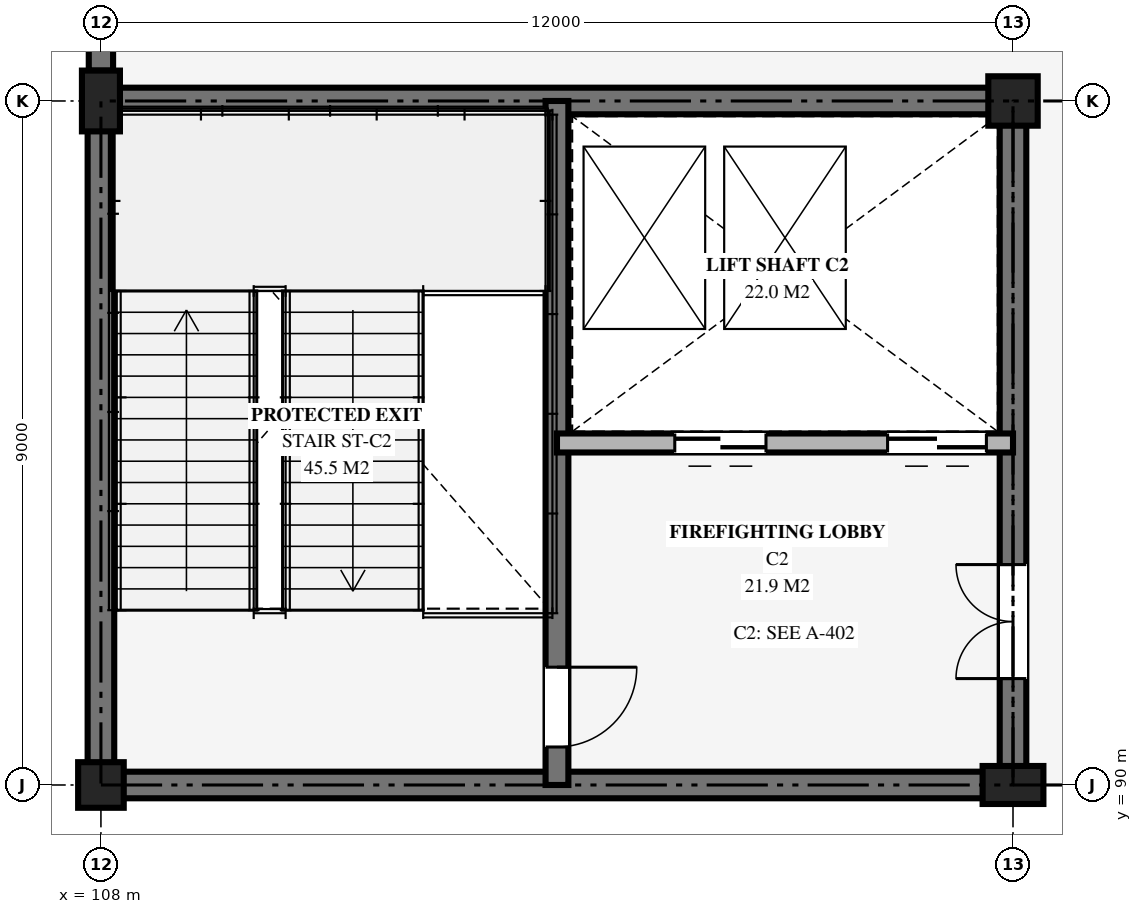
"""IFC4 building model, lengths in metres.
Left out: names, types, materials, properties, quantities, classifications, styles, units other than length and angle.
Written with IfcOpenShell. Run it as: python <this file> out.ifc"""

import sys

from ifc_helpers import new_model, si_unit, direction, frame, frame_2d, origin, origin_2d, place, context, subcontext, project, spatial, rectangle, circle, extrude, element, fill, save


model = new_model("IFC4")
c1 = context("Model", 3, precision=1e-05, world=origin(), true_north=direction((0.0, 1.0)))
c2 = subcontext(c1, "Body", "Model", "MODEL_VIEW")
j1 = project(units=[si_unit("LENGTHUNIT", "METRE"), si_unit("PLANEANGLEUNIT", "RADIAN")], contexts=[c1])
p1 = place(None, origin())
s1 = spatial("IfcSite", under=j1, at=p1, CompositionType="ELEMENT")
p2 = place(p1, origin())
s2 = spatial("IfcBuilding", under=s1, at=p2, CompositionType="ELEMENT")
p3 = place(p2, frame((0.0, 0.0, 15.0)))
s3 = spatial("IfcBuildingStorey", under=s2, at=p3, CompositionType="ELEMENT", Elevation=15.0)
p4 = place(p3, frame((108.0, 90.0, 0.0), z_axis=(0.0, 0.0, 1.0), x_axis=(1.0, 0.0, 0.0)))
e1 = element("IfcColumn", 1, at=p4, inside=s3, PredefinedType="COLUMN", context=c2, shape_type="SweptSolid", body=[
    extrude(circle(Radius=0.3, at=origin_2d()), origin(), (0.0, 0.0, 1.0), 4.34),
])
for number, where, z_axis, x_axis in (
    (2, (108.0, 99.0, 0.0), (0.0, 0.0, 1.0), (1.0, 0.0, 0.0)),
    (3, (120.0, 90.0, 0.0), (0.0, 0.0, 1.0), (0.0, 1.0, 0.0)),
):
    element("IfcColumn", number, at=place(p3, frame(where, z_axis=z_axis, x_axis=x_axis)), inside=s3, PredefinedType="PILASTER", context=c2, shape_type="SweptSolid", body=[
        extrude(rectangle(XDim=0.5, YDim=0.8, at=origin_2d()), origin(), (0.0, 0.0, 1.0), 4.34),
    ])
p5 = place(p3, frame((120.0, 99.0, 0.0), z_axis=(0.0, 0.0, 1.0), x_axis=(1.0, 0.0, 0.0)))
e4 = element("IfcColumn", 4, at=p5, inside=s3, PredefinedType="COLUMN", context=c2, shape_type="SweptSolid", body=[
    extrude(rectangle(XDim=0.65, YDim=0.65, at=origin_2d()), origin(), (0.0, 0.0, 1.0), 4.34),
])
p6 = place(p3, frame((108.0, 107.6, 0.0), z_axis=(0.0, 0.0, 1.0), x_axis=(0.0, -1.0, 0.0)))
e5 = element("IfcWall", 5, at=p6, inside=s3, PredefinedType="SOLIDWALL", context=c2, shape_type="SweptSolid", body=[
    extrude(rectangle(XDim=8.2, YDim=0.32, at=frame_2d((4.1, 0.0))), origin(), (0.0, 0.0, 1.0), 4.24),
])
p7 = place(p6, frame((3.2, 0.0, 1.0)))
e6 = element("IfcOpeningElement", 6, at=p7, cuts=e5, PredefinedType="OPENING", context=c2, shape_type="SweptSolid", body=[
    extrude(rectangle(XDim=1.8, YDim=1.5, at=frame_2d((0.9, 0.75))), frame((0.0, 0.17, 0.0), z_axis=(0.0, -1.0, 0.0), x_axis=(1.0, 0.0, 0.0)), (0.0, 0.0, 1.0), 0.34),
])
for number, where, z_axis, x_axis in (
    (7, (108.0, 90.0, 0.0), (0.0, 0.0, 1.0), (1.0, 0.0, 0.0)),
    (8, (108.0, 99.0, 0.0), (0.0, 0.0, 1.0), (1.0, 0.0, 0.0)),
):
    element("IfcWall", number, at=place(p3, frame(where, z_axis=z_axis, x_axis=x_axis)), inside=s3, PredefinedType="SHEAR", context=c2, shape_type="SweptSolid", body=[
        extrude(rectangle(XDim=12.0, YDim=0.35, at=frame_2d((6.0, 0.0))), origin(), (0.0, 0.0, 1.0), 4.48),
    ])
p8 = place(p3, frame((108.0, 90.0, 0.0), z_axis=(0.0, 0.0, 1.0), x_axis=(0.0, 1.0, 0.0)))
e9 = element("IfcWall", 9, at=p8, inside=s3, PredefinedType="SHEAR", context=c2, shape_type="SweptSolid", body=[
    extrude(rectangle(XDim=9.0, YDim=0.35, at=frame_2d((4.5, 0.0))), origin(), (0.0, 0.0, 1.0), 4.48),
])
p9 = place(p3, frame((120.0, 90.0, 0.0), z_axis=(0.0, 0.0, 1.0), x_axis=(0.0, 1.0, 0.0)))
e10 = element("IfcWall", 10, at=p9, inside=s3, PredefinedType="SHEAR", context=c2, shape_type="SweptSolid", body=[
    extrude(rectangle(XDim=9.0, YDim=0.35, at=frame_2d((4.5, 0.0))), origin(), (0.0, 0.0, 1.0), 4.48),
])
p10 = place(p9, frame((1.4, 0.0, 0.0)))
e11 = element("IfcOpeningElement", 11, at=p10, cuts=e10, PredefinedType="OPENING", context=c2, shape_type="SweptSolid", body=[
    extrude(rectangle(XDim=1.5, YDim=2.2, at=frame_2d((0.75, 1.1))), frame((0.0, 0.185, 0.0), z_axis=(0.0, -1.0, 0.0), x_axis=(1.0, 0.0, 0.0)), (0.0, 0.0, 1.0), 0.37),
])
p11 = place(p3, frame((114.0, 99.0, 0.0), z_axis=(0.0, 0.0, 1.0), x_axis=(0.0, -1.0, 0.0)))
e12 = element("IfcWall", 12, at=p11, inside=s3, PredefinedType="SHEAR", context=c2, shape_type="SweptSolid", body=[
    extrude(rectangle(XDim=9.0, YDim=0.3, at=frame_2d((4.5, 0.0))), origin(), (0.0, 0.0, 1.0), 4.48),
])
p12 = place(p11, frame((7.45, 0.0, 0.0)))
e13 = element("IfcOpeningElement", 13, at=p12, cuts=e12, PredefinedType="OPENING", context=c2, shape_type="SweptSolid", body=[
    extrude(rectangle(XDim=1.05, YDim=2.15, at=frame_2d((0.525, 1.075))), frame((0.0, 0.16, 0.0), z_axis=(0.0, -1.0, 0.0), x_axis=(1.0, 0.0, 0.0)), (0.0, 0.0, 1.0), 0.32),
])
p13 = place(p3, frame((120.0, 94.5, 0.0), z_axis=(0.0, 0.0, 1.0), x_axis=(-1.0, 0.0, 0.0)))
e14 = element("IfcWall", 14, at=p13, inside=s3, PredefinedType="SOLIDWALL", context=c2, shape_type="SweptSolid", body=[
    extrude(rectangle(XDim=6.0, YDim=0.25, at=frame_2d((3.0, 0.0))), origin(), (0.0, 0.0, 1.0), 3.45),
])
p14 = place(p13, frame((0.35, 0.0, 0.0)))
e15 = element("IfcOpeningElement", 15, at=p14, cuts=e14, PredefinedType="OPENING", context=c2, shape_type="SweptSolid", body=[
    extrude(rectangle(XDim=1.3, YDim=2.25, at=frame_2d((0.65, 1.125))), frame((0.0, 0.135, 0.0), z_axis=(0.0, -1.0, 0.0), x_axis=(1.0, 0.0, 0.0)), (0.0, 0.0, 1.0), 0.27),
])
p15 = place(p13, frame((3.25, 0.0, 0.0)))
e16 = element("IfcOpeningElement", 16, at=p15, cuts=e14, PredefinedType="OPENING", context=c2, shape_type="SweptSolid", body=[
    extrude(rectangle(XDim=1.2, YDim=2.2, at=frame_2d((0.6, 1.1))), frame((0.0, 0.135, 0.0), z_axis=(0.0, -1.0, 0.0), x_axis=(1.0, 0.0, 0.0)), (0.0, 0.0, 1.0), 0.27),
])
p16 = place(p14, origin())
e17 = element("IfcDoor", 17, at=p16, inside=s3, OperationType="DOUBLE_DOOR_SLIDING", PredefinedType="USERDEFINED", context=c2, shape_type="SweptSolid", body=[
    extrude(rectangle(XDim=1.3, YDim=2.25, at=frame_2d((0.65, 1.125))), frame((0.0, 0.025, 0.0), z_axis=(0.0, -1.0, 0.0), x_axis=(1.0, 0.0, 0.0)), (0.0, 0.0, 1.0), 0.05),
])
fill(e15, e17)
p17 = place(p15, origin())
e18 = element("IfcDoor", 18, at=p17, inside=s3, OperationType="DOUBLE_DOOR_SLIDING", PredefinedType="USERDEFINED", context=c2, shape_type="SweptSolid", body=[
    extrude(rectangle(XDim=1.2, YDim=2.2, at=frame_2d((0.6, 1.1))), frame((0.0, 0.025, 0.0), z_axis=(0.0, -1.0, 0.0), x_axis=(1.0, 0.0, 0.0)), (0.0, 0.0, 1.0), 0.05),
])
fill(e16, e18)
p18 = place(p12, origin())
e19 = element("IfcDoor", 19, at=p18, inside=s3, OperationType="SINGLE_SWING_LEFT", PredefinedType="DOOR", context=c2, shape_type="SweptSolid", body=[
    extrude(rectangle(XDim=1.05, YDim=2.15, at=frame_2d((0.525, 1.075))), frame((0.0, 0.025, 0.0), z_axis=(0.0, -1.0, 0.0), x_axis=(1.0, 0.0, 0.0)), (0.0, 0.0, 1.0), 0.05),
])
fill(e13, e19)
p19 = place(p10, origin())
e20 = element("IfcDoor", 20, at=p19, inside=s3, OperationType="DOUBLE_DOOR_SINGLE_SWING", PredefinedType="DOOR", context=c2, shape_type="SweptSolid", body=[
    extrude(rectangle(XDim=1.5, YDim=2.2, at=frame_2d((0.75, 1.1))), frame((0.0, 0.025, 0.0), z_axis=(0.0, -1.0, 0.0), x_axis=(1.0, 0.0, 0.0)), (0.0, 0.0, 1.0), 0.05),
])
fill(e11, e20)
save(model, sys.argv[1])
